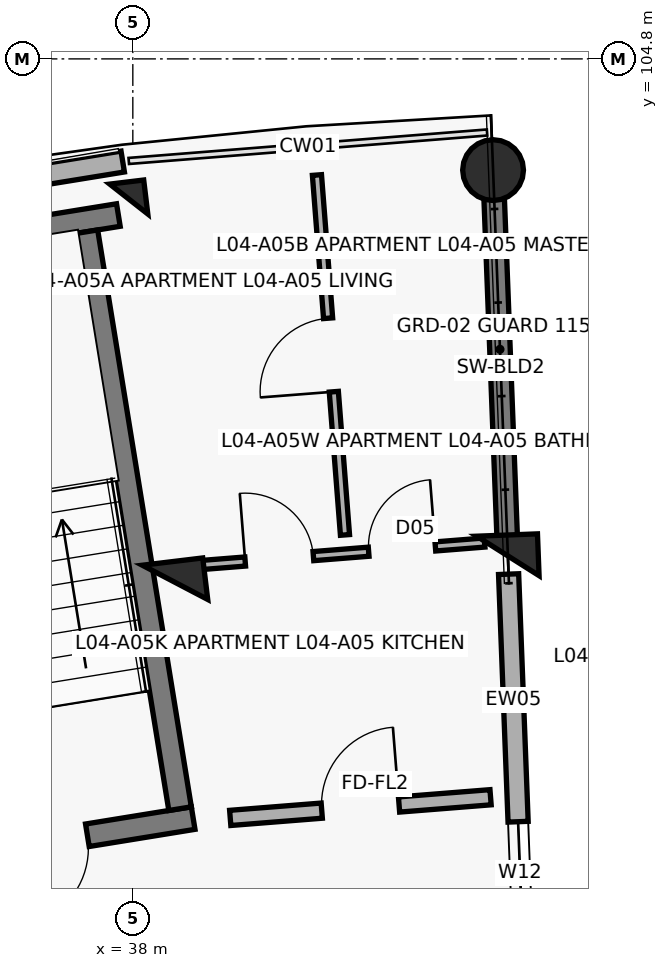
"""IFC4 building model, lengths in metres.
Left out: names, types, materials, properties, quantities, classifications, styles, units other than length and angle.
Written with IfcOpenShell. Run it as: python <this file> out.ifc"""

import sys

from ifc_helpers import new_model, si_unit, direction, frame, frame_2d, origin, origin_2d, place, context, subcontext, project, spatial, rectangle, circle, extrude, element, fill, save


model = new_model("IFC4")
c1 = context("Model", 3, precision=1e-05, world=origin(), true_north=direction((0.0, 1.0)))
c2 = subcontext(c1, "Body", "Model", "MODEL_VIEW")
j1 = project(units=[si_unit("LENGTHUNIT", "METRE"), si_unit("PLANEANGLEUNIT", "RADIAN")], contexts=[c1])
p1 = place(None, origin())
s1 = spatial("IfcSite", under=j1, at=p1, CompositionType="ELEMENT")
p2 = place(p1, origin())
s2 = spatial("IfcBuilding", under=s1, at=p2, CompositionType="ELEMENT")
p3 = place(p2, frame((0.0, 0.0, 14.3)))
s3 = spatial("IfcBuildingStorey", under=s2, at=p3, CompositionType="ELEMENT", Elevation=14.3)
p4 = place(p3, frame((38.555, 97.913, 0.0), z_axis=(0.0, 0.0, 1.0), x_axis=(-0.119790293837, 0.992799217114, 0.0)))
e1 = element("IfcColumn", 1, at=p4, inside=s3, PredefinedType="COLUMN", context=c2, shape_type="SweptSolid", body=[
    extrude(rectangle(XDim=0.55, YDim=0.8, at=origin_2d()), origin(), (0.0, 0.0, 1.0), 3.1),
])
p5 = place(p3, frame((37.947, 102.956, 0.0), z_axis=(0.0, 0.0, 1.0), x_axis=(-0.119790293837, 0.992799217114, 0.0)))
e2 = element("IfcColumn", 2, at=p5, inside=s3, PredefinedType="COLUMN", context=c2, shape_type="SweptSolid", body=[
    extrude(rectangle(XDim=0.45, YDim=0.45, at=origin_2d()), origin(), (0.0, 0.0, 1.0), 3.1),
])
p6 = place(p3, frame((42.935, 98.26, 0.0), z_axis=(0.0, 0.0, 1.0), x_axis=(-0.038387809088, 0.999262916411, 0.0)))
e3 = element("IfcColumn", 3, at=p6, inside=s3, PredefinedType="COLUMN", context=c2, shape_type="SweptSolid", body=[
    extrude(rectangle(XDim=0.55, YDim=0.8, at=origin_2d()), origin(), (0.0, 0.0, 1.0), 3.1),
])
p7 = place(p3, frame((42.74, 103.337, 0.0), z_axis=(0.0, 0.0, 1.0), x_axis=(-0.038387809088, 0.999262916411, 0.0)))
e4 = element("IfcColumn", 4, at=p7, inside=s3, PredefinedType="COLUMN", context=c2, shape_type="SweptSolid", body=[
    extrude(circle(Radius=0.4, at=origin_2d()), origin(), (0.0, 0.0, 1.0), 3.1),
])
p8 = place(p3, frame((42.928, 98.44, 0.0), z_axis=(0.0, 0.0, 1.0), x_axis=(-0.038379487611, 0.999263236055, 0.0)))
e5 = element("IfcWall", 5, at=p8, inside=s3, PredefinedType="SHEAR", context=c2, shape_type="SweptSolid", body=[
    extrude(rectangle(XDim=4.72, YDim=0.27, at=frame_2d((2.36, 0.0))), origin(), (0.0, 0.0, 1.0), 2.86),
])
p9 = place(p3, frame((33.12, 102.679, 0.0), z_axis=(0.0, 0.0, 1.0), x_axis=(0.987080750493, 0.160223568819, 0.0)))
e6 = element("IfcWall", 6, at=p9, inside=s3, PredefinedType="SOLIDWALL", context=c2, shape_type="SweptSolid", body=[
    extrude(rectangle(XDim=4.809, YDim=0.278, at=frame_2d((2.404, 0.0))), origin(), (0.0, 0.0, 1.0), 2.25),
])
p10 = place(p3, frame((43.259, 89.827, 0.0), z_axis=(0.0, 0.0, 1.0), x_axis=(-0.038407966241, 0.999262141847, 0.0)))
e7 = element("IfcWall", 7, at=p10, inside=s3, PredefinedType="SOLIDWALL", context=c2, shape_type="SweptSolid", body=[
    extrude(rectangle(XDim=8.2, YDim=0.265, at=frame_2d((4.1, 0.0))), origin(), (0.0, 0.0, 1.0), 2.08),
])
p11 = place(p10, frame((3.59, 0.0, 0.75)))
e8 = element("IfcOpeningElement", 8, at=p11, cuts=e7, PredefinedType="OPENING", context=c2, shape_type="SweptSolid", body=[
    extrude(rectangle(XDim=1.35, YDim=1.35, at=frame_2d((0.675, 0.675))), frame((0.0, 0.142, 0.0), z_axis=(0.0, -1.0, 0.0), x_axis=(1.0, 0.0, 0.0)), (0.0, 0.0, 1.0), 0.285),
])
p12 = place(p3, frame((38.794, 94.811, 0.0), z_axis=(0.0, 0.0, 1.0), x_axis=(-0.987077443397, -0.160243941341, 0.0)))
e9 = element("IfcWall", 9, at=p12, inside=s3, PredefinedType="SHEAR", context=c2, shape_type="SweptSolid", body=[
    extrude(rectangle(XDim=3.87, YDim=0.3, at=frame_2d((1.935, 0.0))), origin(), (0.0, 0.0, 1.0), 3.1),
])
p13 = place(p12, frame((1.41, 0.0, 0.0)))
e10 = element("IfcOpeningElement", 10, at=p13, cuts=e9, PredefinedType="OPENING", context=c2, shape_type="SweptSolid", body=[
    extrude(rectangle(XDim=1.05, YDim=2.15, at=frame_2d((0.525, 1.075))), frame((0.0, 0.16, 0.0), z_axis=(0.0, -1.0, 0.0), x_axis=(1.0, 0.0, 0.0)), (0.0, 0.0, 1.0), 0.32),
])
p14 = place(p3, frame((37.81, 102.745, 0.0), z_axis=(0.0, 0.0, 1.0), x_axis=(-0.987084710126, -0.160199173019, 0.0)))
e11 = element("IfcWall", 11, at=p14, inside=s3, PredefinedType="SHEAR", context=c2, shape_type="SweptSolid", body=[
    extrude(rectangle(XDim=4.47, YDim=0.3, at=frame_2d((2.235, 0.0))), origin(), (0.0, 0.0, 1.0), 3.1),
])
p15 = place(p3, frame((38.622, 94.935, 0.0), z_axis=(0.0, 0.0, 1.0), x_axis=(-0.160196564502, 0.987085133472, 0.0)))
e12 = element("IfcWall", 12, at=p15, inside=s3, PredefinedType="SHEAR", context=c2, shape_type="SweptSolid", body=[
    extrude(rectangle(XDim=7.69, YDim=0.3, at=frame_2d((3.845, 0.0))), origin(), (0.0, 0.0, 1.0), 3.1),
])
p16 = place(p3, frame((39.281, 94.813, 0.0), z_axis=(0.0, 0.0, 1.0), x_axis=(0.996862545573, 0.079152165058, 0.0)))
e13 = element("IfcWall", 13, at=p16, inside=s3, PredefinedType="SOLIDWALL", context=c2, shape_type="SweptSolid", body=[
    extrude(rectangle(XDim=3.436, YDim=0.2, at=frame_2d((1.718, 0.0))), origin(), (0.0, 0.0, 1.0), 2.08),
])
p17 = place(p16, frame((1.208, 0.0, 0.0)))
e14 = element("IfcOpeningElement", 14, at=p17, cuts=e13, PredefinedType="OPENING", context=c2, shape_type="SweptSolid", body=[
    extrude(rectangle(XDim=1.02, YDim=2.15, at=frame_2d((0.51, 1.075))), frame((0.0, 0.11, 0.0), z_axis=(0.0, -1.0, 0.0), x_axis=(1.0, 0.0, 0.0)), (0.0, 0.0, 1.0), 0.22),
])
p18 = place(p3, frame((38.83, 98.135, 0.0), z_axis=(0.0, 0.0, 1.0), x_axis=(0.996862985267, 0.079146627246, 0.0)))
e15 = element("IfcWall", 15, at=p18, inside=s3, PredefinedType="PARTITIONING", context=c2, shape_type="SweptSolid", body=[
    extrude(rectangle(XDim=3.81, YDim=0.12, at=frame_2d((1.905, 0.0))), origin(), (0.0, 0.0, 1.0), 2.08),
])
p19 = place(p18, frame((0.65, 0.0, 0.0)))
e16 = element("IfcOpeningElement", 16, at=p19, cuts=e15, PredefinedType="OPENING", context=c2, shape_type="SweptSolid", body=[
    extrude(rectangle(XDim=0.9, YDim=2.1, at=frame_2d((0.45, 1.05))), frame((0.0, 0.07, 0.0), z_axis=(0.0, -1.0, 0.0), x_axis=(1.0, 0.0, 0.0)), (0.0, 0.0, 1.0), 0.14),
])
p20 = place(p18, frame((2.28, 0.0, 0.0)))
e17 = element("IfcOpeningElement", 17, at=p20, cuts=e15, PredefinedType="OPENING", context=c2, shape_type="SweptSolid", body=[
    extrude(rectangle(XDim=0.88, YDim=2.1, at=frame_2d((0.44, 1.05))), frame((0.0, 0.07, 0.0), z_axis=(0.0, -1.0, 0.0), x_axis=(1.0, 0.0, 0.0)), (0.0, 0.0, 1.0), 0.14),
])
p21 = place(p3, frame((40.791, 98.536, 0.0), z_axis=(0.0, 0.0, 1.0), x_axis=(-0.077663362156, 0.996979639801, 0.0)))
e18 = element("IfcWall", 18, at=p21, inside=s3, PredefinedType="PARTITIONING", context=c2, shape_type="SweptSolid", body=[
    extrude(rectangle(XDim=4.75, YDim=0.12, at=frame_2d((2.375, 0.0))), origin(), (0.0, 0.0, 1.0), 2.08),
])
p22 = place(p21, frame((1.89, 0.0, 0.0)))
e19 = element("IfcOpeningElement", 19, at=p22, cuts=e18, PredefinedType="OPENING", context=c2, shape_type="SweptSolid", body=[
    extrude(rectangle(XDim=0.97, YDim=2.1, at=frame_2d((0.485, 1.05))), frame((0.0, 0.07, 0.0), z_axis=(0.0, -1.0, 0.0), x_axis=(1.0, 0.0, 0.0)), (0.0, 0.0, 1.0), 0.14),
])
p23 = place(p11, origin())
e20 = element("IfcWindow", 20, at=p23, inside=s3, PartitioningType="DOUBLE_PANEL_VERTICAL", PredefinedType="WINDOW", context=c2, shape_type="SweptSolid", body=[
    extrude(rectangle(XDim=1.35, YDim=1.35, at=frame_2d((0.675, 0.675))), frame((0.0, 0.03, 0.0), z_axis=(0.0, -1.0, 0.0), x_axis=(1.0, 0.0, 0.0)), (0.0, 0.0, 1.0), 0.06),
])
fill(e8, e20)
p24 = place(p13, origin())
e21 = element("IfcDoor", 21, at=p24, inside=s3, OperationType="SINGLE_SWING_RIGHT", PredefinedType="DOOR", context=c2, shape_type="SweptSolid", body=[
    extrude(rectangle(XDim=1.05, YDim=2.15, at=frame_2d((0.525, 1.075))), frame((0.0, 0.025, 0.0), z_axis=(0.0, -1.0, 0.0), x_axis=(1.0, 0.0, 0.0)), (0.0, 0.0, 1.0), 0.05),
])
fill(e10, e21)
p25 = place(p17, origin())
e22 = element("IfcDoor", 22, at=p25, inside=s3, OperationType="SINGLE_SWING_RIGHT", PredefinedType="DOOR", context=c2, shape_type="SweptSolid", body=[
    extrude(rectangle(XDim=1.02, YDim=2.15, at=frame_2d((0.51, 1.075))), frame((0.0, 0.025, 0.0), z_axis=(0.0, -1.0, 0.0), x_axis=(1.0, 0.0, 0.0)), (0.0, 0.0, 1.0), 0.05),
])
fill(e14, e22)
p26 = place(p19, origin())
e23 = element("IfcDoor", 23, at=p26, inside=s3, OperationType="SINGLE_SWING_LEFT", PredefinedType="DOOR", context=c2, shape_type="SweptSolid", body=[
    extrude(rectangle(XDim=0.9, YDim=2.1, at=frame_2d((0.45, 1.05))), frame((0.0, 0.025, 0.0), z_axis=(0.0, -1.0, 0.0), x_axis=(1.0, 0.0, 0.0)), (0.0, 0.0, 1.0), 0.05),
])
fill(e16, e23)
p27 = place(p20, origin())
e24 = element("IfcDoor", 24, at=p27, inside=s3, OperationType="SINGLE_SWING_RIGHT", PredefinedType="DOOR", context=c2, shape_type="SweptSolid", body=[
    extrude(rectangle(XDim=0.88, YDim=2.1, at=frame_2d((0.44, 1.05))), frame((0.0, 0.025, 0.0), z_axis=(0.0, -1.0, 0.0), x_axis=(1.0, 0.0, 0.0)), (0.0, 0.0, 1.0), 0.05),
])
fill(e17, e24)
p28 = place(p22, origin())
e25 = element("IfcDoor", 25, at=p28, inside=s3, OperationType="SINGLE_SWING_LEFT", PredefinedType="DOOR", context=c2, shape_type="SweptSolid", body=[
    extrude(rectangle(XDim=0.97, YDim=2.1, at=frame_2d((0.485, 1.05))), frame((0.0, 0.025, 0.0), z_axis=(0.0, -1.0, 0.0), x_axis=(1.0, 0.0, 0.0)), (0.0, 0.0, 1.0), 0.05),
])
fill(e19, e25)
save(model, sys.argv[1])
